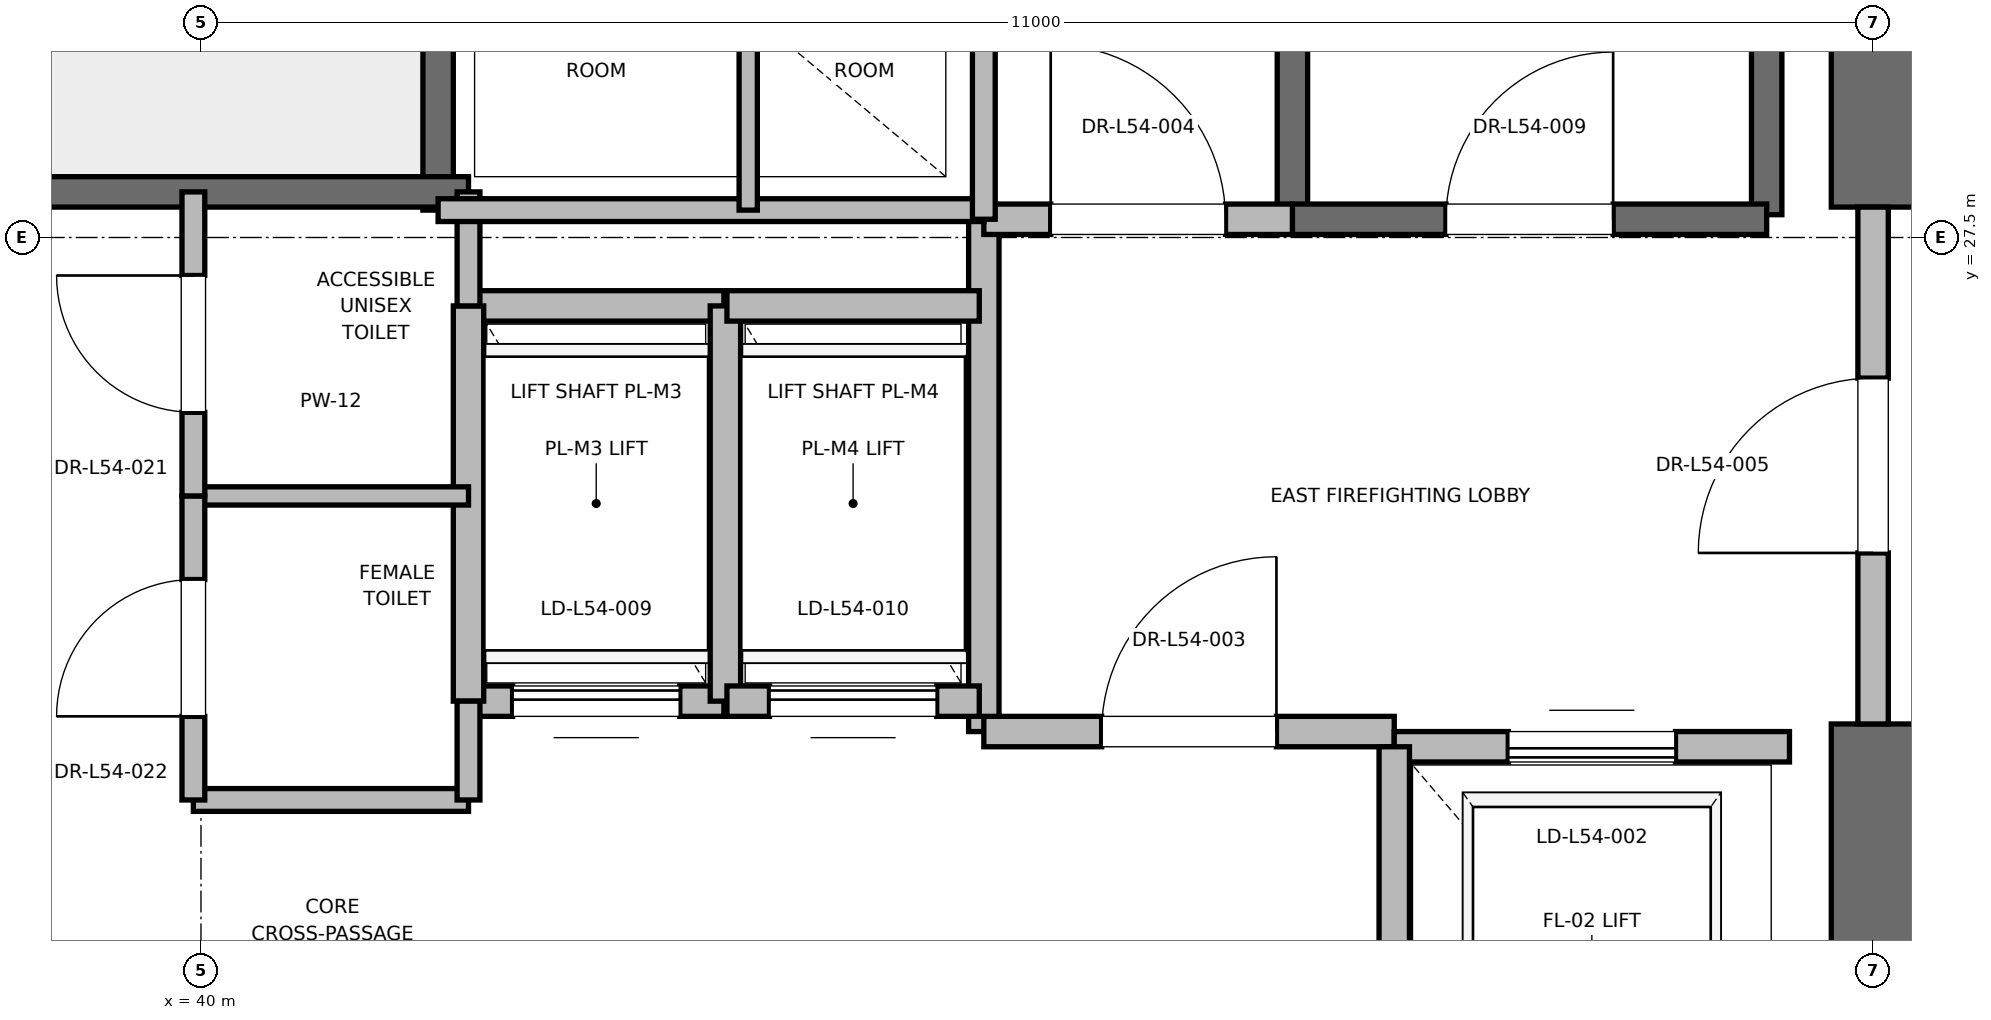
"""IFC4 building model, lengths in metres.
Left out: names, types, materials, properties, quantities, classifications, styles, units other than length and angle.
Written with IfcOpenShell. Run it as: python <this file> out.ifc"""

import sys

from ifc_helpers import new_model, si_unit, direction, frame, frame_2d, origin, place, context, subcontext, project, spatial, rectangle, extrude, element, fill, save


model = new_model("IFC4")
c1 = context("Model", 3, precision=1e-05, world=origin(), true_north=direction((0.0, 1.0)))
c2 = subcontext(c1, "Body", "Model", "MODEL_VIEW")
j1 = project(units=[si_unit("LENGTHUNIT", "METRE"), si_unit("PLANEANGLEUNIT", "RADIAN")], contexts=[c1])
p1 = place(None, origin())
s1 = spatial("IfcSite", under=j1, at=p1, CompositionType="ELEMENT")
p2 = place(p1, origin())
s2 = spatial("IfcBuilding", under=s1, at=p2, CompositionType="ELEMENT")
p3 = place(p2, frame((0.0, 0.0, 233.2)))
s3 = spatial("IfcBuildingStorey", under=s2, at=p3, CompositionType="ELEMENT", Elevation=233.2)
p4 = place(p3, frame((51.0, 18.5, 0.0), z_axis=(0.0, 0.0, 1.0), x_axis=(0.0, 1.0, 0.0)))
e1 = element("IfcWall", 1, at=p4, inside=s3, PredefinedType="SHEAR", context=c2, shape_type="SweptSolid", body=[
    extrude(rectangle(XDim=5.8, YDim=0.55, at=frame_2d((2.9, 0.0))), origin(), (0.0, 0.0, 1.0), 4.7),
])
p5 = place(p3, frame((51.0, 27.7, 0.0), z_axis=(0.0, 0.0, 1.0), x_axis=(0.0, 1.0, 0.0)))
e2 = element("IfcWall", 2, at=p5, inside=s3, PredefinedType="SHEAR", context=c2, shape_type="SweptSolid", body=[
    extrude(rectangle(XDim=8.8, YDim=0.55, at=frame_2d((4.4, 0.0))), origin(), (0.0, 0.0, 1.0), 4.7),
])
p6 = place(p3, frame((50.3, 27.65, 0.0), z_axis=(0.0, 0.0, 1.0), x_axis=(0.0, 1.0, 0.0)))
e3 = element("IfcWall", 3, at=p6, inside=s3, PredefinedType="SOLIDWALL", context=c2, shape_type="SweptSolid", body=[
    extrude(rectangle(XDim=8.15, YDim=0.2, at=frame_2d((4.075, 0.0))), origin(), (0.0, 0.0, 1.0), 4.7),
])
p7 = place(p3, frame((47.18, 27.62, 0.0), z_axis=(0.0, 0.0, 1.0), x_axis=(0.0, 1.0, 0.0)))
e4 = element("IfcWall", 4, at=p7, inside=s3, PredefinedType="SOLIDWALL", context=c2, shape_type="SweptSolid", body=[
    extrude(rectangle(XDim=8.18, YDim=0.2, at=frame_2d((4.09, 0.0))), origin(), (0.0, 0.0, 1.0), 4.7),
])
p8 = place(p3, frame((47.18, 27.62, 0.0), z_axis=(0.0, 0.0, 1.0), x_axis=(1.0, 0.0, 0.0)))
e5 = element("IfcWall", 5, at=p8, inside=s3, PredefinedType="SOLIDWALL", context=c2, shape_type="SweptSolid", body=[
    extrude(rectangle(XDim=3.12, YDim=0.2, at=frame_2d((1.56, 0.0))), origin(), (0.0, 0.0, 1.0), 4.7),
])
p9 = place(p8, frame((1.01, 0.0, 0.0)))
e6 = element("IfcOpeningElement", 6, at=p9, cuts=e5, PredefinedType="OPENING", context=c2, shape_type="SweptSolid", body=[
    extrude(rectangle(XDim=1.1, YDim=2.15, at=frame_2d((0.55, 1.075))), frame((0.0, 0.1, 0.0), z_axis=(0.0, -1.0, 0.0), x_axis=(1.0, 0.0, 0.0)), (0.0, 0.0, 1.0), 0.2),
])
p10 = place(p3, frame((41.56, 27.68, 0.0), z_axis=(0.0, 0.0, 1.0), x_axis=(0.0, 1.0, 0.0)))
e7 = element("IfcWall", 7, at=p10, inside=s3, PredefinedType="SOLIDWALL", context=c2, shape_type="SweptSolid", body=[
    extrude(rectangle(XDim=8.57, YDim=0.2, at=frame_2d((4.285, 0.0))), origin(), (0.0, 0.0, 1.0), 4.7),
])
p11 = place(p3, frame((38.44, 27.8, 0.0), z_axis=(0.0, 0.0, 1.0), x_axis=(1.0, 0.0, 0.0)))
e8 = element("IfcWall", 8, at=p11, inside=s3, PredefinedType="SOLIDWALL", context=c2, shape_type="SweptSolid", body=[
    extrude(rectangle(XDim=3.32, YDim=0.2, at=frame_2d((1.66, 0.0))), origin(), (0.0, 0.0, 1.0), 4.7),
])
p12 = place(p3, frame((45.15, 24.25, 0.0), z_axis=(0.0, 0.0, 1.0), x_axis=(0.0, 1.0, 0.0)))
e9 = element("IfcWall", 9, at=p12, inside=s3, PredefinedType="PARTITIONING", context=c2, shape_type="SweptSolid", body=[
    extrude(rectangle(XDim=3.37, YDim=0.2, at=frame_2d((1.685, 0.0))), origin(), (0.0, 0.0, 1.0), 4.7),
])
p13 = place(p3, frame((45.15, 24.25, 0.0), z_axis=(0.0, 0.0, 1.0), x_axis=(1.0, 0.0, 0.0)))
e10 = element("IfcWall", 10, at=p13, inside=s3, PredefinedType="PARTITIONING", context=c2, shape_type="SweptSolid", body=[
    extrude(rectangle(XDim=2.7, YDim=0.2, at=frame_2d((1.35, 0.0))), origin(), (0.0, 0.0, 1.0), 4.7),
])
p14 = place(p13, frame((0.775, 0.0, 0.0)))
e11 = element("IfcOpeningElement", 11, at=p14, cuts=e10, PredefinedType="OPENING", context=c2, shape_type="SweptSolid", body=[
    extrude(rectangle(XDim=1.15, YDim=2.2, at=frame_2d((0.575, 1.1))), frame((0.0, 0.1, 0.0), z_axis=(0.0, -1.0, 0.0), x_axis=(1.0, 0.0, 0.0)), (0.0, 0.0, 1.0), 0.2),
])
p15 = place(p3, frame((45.15, 27.62, 0.0), z_axis=(0.0, 0.0, 1.0), x_axis=(1.0, 0.0, 0.0)))
e12 = element("IfcWall", 12, at=p15, inside=s3, PredefinedType="PARTITIONING", context=c2, shape_type="SweptSolid", body=[
    extrude(rectangle(XDim=2.03, YDim=0.2, at=frame_2d((1.015, 0.0))), origin(), (0.0, 0.0, 1.0), 4.7),
])
p16 = place(p15, frame((0.44, 0.0, 0.0)))
e13 = element("IfcOpeningElement", 13, at=p16, cuts=e12, PredefinedType="OPENING", context=c2, shape_type="SweptSolid", body=[
    extrude(rectangle(XDim=1.15, YDim=2.2, at=frame_2d((0.575, 1.1))), frame((0.0, 0.1, 0.0), z_axis=(0.0, -1.0, 0.0), x_axis=(1.0, 0.0, 0.0)), (0.0, 0.0, 1.0), 0.2),
])
p17 = place(p3, frame((51.0, 24.3, 0.0), z_axis=(0.0, 0.0, 1.0), x_axis=(0.0, 1.0, 0.0)))
e14 = element("IfcWall", 14, at=p17, inside=s3, PredefinedType="PARTITIONING", context=c2, shape_type="SweptSolid", body=[
    extrude(rectangle(XDim=3.4, YDim=0.2, at=frame_2d((1.7, 0.0))), origin(), (0.0, 0.0, 1.0), 3.68),
])
p18 = place(p17, frame((1.125, 0.0, 0.0)))
e15 = element("IfcOpeningElement", 15, at=p18, cuts=e14, PredefinedType="OPENING", context=c2, shape_type="SweptSolid", body=[
    extrude(rectangle(XDim=1.15, YDim=2.2, at=frame_2d((0.575, 1.1))), frame((0.0, 0.1, 0.0), z_axis=(0.0, -1.0, 0.0), x_axis=(1.0, 0.0, 0.0)), (0.0, 0.0, 1.0), 0.2),
])
p19 = place(p3, frame((50.45, 24.15, 0.0), z_axis=(0.0, 0.0, 1.0), x_axis=(-1.0, 0.0, 0.0)))
e16 = element("IfcWall", 16, at=p19, inside=s3, PredefinedType="SOLIDWALL", context=c2, shape_type="SweptSolid", body=[
    extrude(rectangle(XDim=2.6, YDim=0.2, at=frame_2d((1.3, 0.0))), origin(), (0.0, 0.0, 1.0), 3.68),
])
p20 = place(p19, frame((0.75, 0.0, 0.0)))
e17 = element("IfcOpeningElement", 17, at=p20, cuts=e16, PredefinedType="OPENING", context=c2, shape_type="SweptSolid", body=[
    extrude(rectangle(XDim=1.1, YDim=2.2, at=frame_2d((0.55, 1.1))), frame((0.0, 0.1, 0.0), z_axis=(0.0, -1.0, 0.0), x_axis=(1.0, 0.0, 0.0)), (0.0, 0.0, 1.0), 0.2),
])
p21 = place(p3, frame((47.85, 24.15, 0.0), z_axis=(0.0, 0.0, 1.0), x_axis=(0.0, -1.0, 0.0)))
e18 = element("IfcWall", 18, at=p21, inside=s3, PredefinedType="SOLIDWALL", context=c2, shape_type="SweptSolid", body=[
    extrude(rectangle(XDim=3.0, YDim=0.2, at=frame_2d((1.5, 0.0))), origin(), (0.0, 0.0, 1.0), 4.7),
])
p22 = place(p3, frame((41.76, 24.45, 0.0), z_axis=(0.0, 0.0, 1.0), x_axis=(1.0, 0.0, 0.0)))
e19 = element("IfcWall", 19, at=p22, inside=s3, PredefinedType="SOLIDWALL", context=c2, shape_type="SweptSolid", body=[
    extrude(rectangle(XDim=1.68, YDim=0.2, at=frame_2d((0.84, 0.0))), origin(), (0.0, 0.0, 1.0), 4.7),
])
p23 = place(p22, frame((0.29, 0.0, 0.0)))
e20 = element("IfcOpeningElement", 20, at=p23, cuts=e19, PredefinedType="OPENING", context=c2, shape_type="SweptSolid", body=[
    extrude(rectangle(XDim=1.1, YDim=2.2, at=frame_2d((0.55, 1.1))), frame((0.0, 0.1, 0.0), z_axis=(0.0, -1.0, 0.0), x_axis=(1.0, 0.0, 0.0)), (0.0, 0.0, 1.0), 0.2),
])
p24 = place(p3, frame((43.44, 27.05, 0.0), z_axis=(0.0, 0.0, 1.0), x_axis=(-1.0, 0.0, 0.0)))
e21 = element("IfcWall", 21, at=p24, inside=s3, PredefinedType="SOLIDWALL", context=c2, shape_type="SweptSolid", body=[
    extrude(rectangle(XDim=1.68, YDim=0.2, at=frame_2d((0.84, 0.0))), origin(), (0.0, 0.0, 1.0), 4.7),
])
for number, where, z_axis, x_axis in (
    (22, (41.76, 27.05, 0.0), (0.0, 0.0, 1.0), (0.0, -1.0, 0.0)),
    (23, (43.45, 24.45, 0.0), (0.0, 0.0, 1.0), (0.0, 1.0, 0.0)),
):
    element("IfcWall", number, at=place(p3, frame(where, z_axis=z_axis, x_axis=x_axis)), inside=s3, PredefinedType="SOLIDWALL", context=c2, shape_type="SweptSolid", body=[
        extrude(rectangle(XDim=2.6, YDim=0.2, at=frame_2d((1.3, 0.0))), origin(), (0.0, 0.0, 1.0), 4.7),
    ])
p25 = place(p3, frame((43.46, 24.45, 0.0), z_axis=(0.0, 0.0, 1.0), x_axis=(1.0, 0.0, 0.0)))
e24 = element("IfcWall", 24, at=p25, inside=s3, PredefinedType="SOLIDWALL", context=c2, shape_type="SweptSolid", body=[
    extrude(rectangle(XDim=1.66, YDim=0.2, at=frame_2d((0.83, 0.0))), origin(), (0.0, 0.0, 1.0), 4.7),
])
p26 = place(p25, frame((0.28, 0.0, 0.0)))
e25 = element("IfcOpeningElement", 25, at=p26, cuts=e24, PredefinedType="OPENING", context=c2, shape_type="SweptSolid", body=[
    extrude(rectangle(XDim=1.1, YDim=2.2, at=frame_2d((0.55, 1.1))), frame((0.0, 0.1, 0.0), z_axis=(0.0, -1.0, 0.0), x_axis=(1.0, 0.0, 0.0)), (0.0, 0.0, 1.0), 0.2),
])
p27 = place(p3, frame((45.12, 27.05, 0.0), z_axis=(0.0, 0.0, 1.0), x_axis=(-1.0, 0.0, 0.0)))
e26 = element("IfcWall", 26, at=p27, inside=s3, PredefinedType="SOLIDWALL", context=c2, shape_type="SweptSolid", body=[
    extrude(rectangle(XDim=1.66, YDim=0.2, at=frame_2d((0.83, 0.0))), origin(), (0.0, 0.0, 1.0), 4.7),
])
p28 = place(p3, frame((39.95, 23.8, 0.0), z_axis=(0.0, 0.0, 1.0), x_axis=(1.0, 0.0, 0.0)))
e27 = element("IfcWall", 27, at=p28, inside=s3, PredefinedType="PARTITIONING", context=c2, shape_type="SweptSolid", body=[
    extrude(rectangle(XDim=1.81, YDim=0.15, at=frame_2d((0.905, 0.0))), origin(), (0.0, 0.0, 1.0), 2.85),
])
p29 = place(p3, frame((39.95, 25.8, 0.0), z_axis=(0.0, 0.0, 1.0), x_axis=(1.0, 0.0, 0.0)))
e28 = element("IfcWall", 28, at=p29, inside=s3, PredefinedType="PARTITIONING", context=c2, shape_type="SweptSolid", body=[
    extrude(rectangle(XDim=1.81, YDim=0.12, at=frame_2d((0.905, 0.0))), origin(), (0.0, 0.0, 1.0), 2.85),
])
p30 = place(p3, frame((41.76, 23.8, 0.0), z_axis=(0.0, 0.0, 1.0), x_axis=(0.0, 1.0, 0.0)))
e29 = element("IfcWall", 29, at=p30, inside=s3, PredefinedType="PARTITIONING", context=c2, shape_type="SweptSolid", body=[
    extrude(rectangle(XDim=0.65, YDim=0.15, at=frame_2d((0.325, 0.0))), origin(), (0.0, 0.0, 1.0), 2.85),
])
p31 = place(p3, frame((41.76, 27.05, 0.0), z_axis=(0.0, 0.0, 1.0), x_axis=(0.0, 1.0, 0.0)))
e30 = element("IfcWall", 30, at=p31, inside=s3, PredefinedType="PARTITIONING", context=c2, shape_type="SweptSolid", body=[
    extrude(rectangle(XDim=0.75, YDim=0.15, at=frame_2d((0.375, 0.0))), origin(), (0.0, 0.0, 1.0), 2.85),
])
p32 = place(p3, frame((39.95, 23.8, 0.0), z_axis=(0.0, 0.0, 1.0), x_axis=(0.0, 1.0, 0.0)))
e31 = element("IfcWall", 31, at=p32, inside=s3, PredefinedType="PARTITIONING", context=c2, shape_type="SweptSolid", body=[
    extrude(rectangle(XDim=2.0, YDim=0.15, at=frame_2d((1.0, 0.0))), origin(), (0.0, 0.0, 1.0), 2.85),
])
p33 = place(p32, frame((0.55, 0.0, 0.0)))
e32 = element("IfcOpeningElement", 32, at=p33, cuts=e31, PredefinedType="OPENING", context=c2, shape_type="SweptSolid", body=[
    extrude(rectangle(XDim=0.9, YDim=2.1, at=frame_2d((0.45, 1.05))), frame((0.0, 0.075, 0.0), z_axis=(0.0, -1.0, 0.0), x_axis=(1.0, 0.0, 0.0)), (0.0, 0.0, 1.0), 0.15),
])
p34 = place(p3, frame((39.95, 25.8, 0.0), z_axis=(0.0, 0.0, 1.0), x_axis=(0.0, 1.0, 0.0)))
e33 = element("IfcWall", 33, at=p34, inside=s3, PredefinedType="PARTITIONING", context=c2, shape_type="SweptSolid", body=[
    extrude(rectangle(XDim=2.0, YDim=0.15, at=frame_2d((1.0, 0.0))), origin(), (0.0, 0.0, 1.0), 2.85),
])
p35 = place(p34, frame((0.55, 0.0, 0.0)))
e34 = element("IfcOpeningElement", 34, at=p35, cuts=e33, PredefinedType="OPENING", context=c2, shape_type="SweptSolid", body=[
    extrude(rectangle(XDim=0.9, YDim=2.1, at=frame_2d((0.45, 1.05))), frame((0.0, 0.075, 0.0), z_axis=(0.0, -1.0, 0.0), x_axis=(1.0, 0.0, 0.0)), (0.0, 0.0, 1.0), 0.15),
])
p36 = place(p3, frame((41.56, 27.68, 0.0), z_axis=(0.0, 0.0, 1.0), x_axis=(1.0, 0.0, 0.0)))
e35 = element("IfcWall", 35, at=p36, inside=s3, PredefinedType="PARTITIONING", context=c2, shape_type="SweptSolid", body=[
    extrude(rectangle(XDim=3.59, YDim=0.15, at=frame_2d((1.795, 0.0))), origin(), (0.0, 0.0, 1.0), 2.85),
])
p37 = place(p3, frame((45.15, 27.62, 0.0), z_axis=(0.0, 0.0, 1.0), x_axis=(0.0, 1.0, 0.0)))
e36 = element("IfcWall", 36, at=p37, inside=s3, PredefinedType="PARTITIONING", context=c2, shape_type="SweptSolid", body=[
    extrude(rectangle(XDim=3.1, YDim=0.15, at=frame_2d((1.55, 0.0))), origin(), (0.0, 0.0, 1.0), 2.85),
])
p38 = place(p3, frame((43.6, 27.68, 0.0), z_axis=(0.0, 0.0, 1.0), x_axis=(0.0, 1.0, 0.0)))
e37 = element("IfcWall", 37, at=p38, inside=s3, PredefinedType="PARTITIONING", context=c2, shape_type="SweptSolid", body=[
    extrude(rectangle(XDim=3.04, YDim=0.12, at=frame_2d((1.52, 0.0))), origin(), (0.0, 0.0, 1.0), 2.85),
])
p39 = place(p9, origin())
e38 = element("IfcDoor", 38, at=p39, inside=s3, OperationType="SINGLE_SWING_RIGHT", PredefinedType="DOOR", context=c2, shape_type="SweptSolid", body=[
    extrude(rectangle(XDim=1.1, YDim=2.15, at=frame_2d((0.55, 1.075))), frame((0.0, 0.025, 0.0), z_axis=(0.0, -1.0, 0.0), x_axis=(1.0, 0.0, 0.0)), (0.0, 0.0, 1.0), 0.05),
])
fill(e6, e38)
p40 = place(p14, origin())
e39 = element("IfcDoor", 39, at=p40, inside=s3, OperationType="SINGLE_SWING_RIGHT", PredefinedType="DOOR", context=c2, shape_type="SweptSolid", body=[
    extrude(rectangle(XDim=1.15, YDim=2.2, at=frame_2d((0.575, 1.1))), frame((0.0, 0.025, 0.0), z_axis=(0.0, -1.0, 0.0), x_axis=(1.0, 0.0, 0.0)), (0.0, 0.0, 1.0), 0.05),
])
fill(e11, e39)
p41 = place(p16, origin())
e40 = element("IfcDoor", 40, at=p41, inside=s3, OperationType="SINGLE_SWING_LEFT", PredefinedType="DOOR", context=c2, shape_type="SweptSolid", body=[
    extrude(rectangle(XDim=1.15, YDim=2.2, at=frame_2d((0.575, 1.1))), frame((0.0, 0.025, 0.0), z_axis=(0.0, -1.0, 0.0), x_axis=(1.0, 0.0, 0.0)), (0.0, 0.0, 1.0), 0.05),
])
fill(e13, e40)
p42 = place(p18, origin())
e41 = element("IfcDoor", 41, at=p42, inside=s3, OperationType="SINGLE_SWING_LEFT", PredefinedType="DOOR", context=c2, shape_type="SweptSolid", body=[
    extrude(rectangle(XDim=1.15, YDim=2.2, at=frame_2d((0.575, 1.1))), frame((0.0, 0.025, 0.0), z_axis=(0.0, -1.0, 0.0), x_axis=(1.0, 0.0, 0.0)), (0.0, 0.0, 1.0), 0.05),
])
fill(e15, e41)
p43 = place(p20, origin())
e42 = element("IfcDoor", 42, at=p43, inside=s3, OperationType="SLIDING_TO_RIGHT", PredefinedType="DOOR", context=c2, shape_type="SweptSolid", body=[
    extrude(rectangle(XDim=1.1, YDim=2.2, at=frame_2d((0.55, 1.1))), frame((0.0, 0.025, 0.0), z_axis=(0.0, -1.0, 0.0), x_axis=(1.0, 0.0, 0.0)), (0.0, 0.0, 1.0), 0.05),
])
fill(e17, e42)
p44 = place(p23, origin())
e43 = element("IfcDoor", 43, at=p44, inside=s3, OperationType="SLIDING_TO_RIGHT", PredefinedType="DOOR", context=c2, shape_type="SweptSolid", body=[
    extrude(rectangle(XDim=1.1, YDim=2.2, at=frame_2d((0.55, 1.1))), frame((0.0, 0.025, 0.0), z_axis=(0.0, -1.0, 0.0), x_axis=(1.0, 0.0, 0.0)), (0.0, 0.0, 1.0), 0.05),
])
fill(e20, e43)
p45 = place(p26, origin())
e44 = element("IfcDoor", 44, at=p45, inside=s3, OperationType="SLIDING_TO_RIGHT", PredefinedType="DOOR", context=c2, shape_type="SweptSolid", body=[
    extrude(rectangle(XDim=1.1, YDim=2.2, at=frame_2d((0.55, 1.1))), frame((0.0, 0.025, 0.0), z_axis=(0.0, -1.0, 0.0), x_axis=(1.0, 0.0, 0.0)), (0.0, 0.0, 1.0), 0.05),
])
fill(e25, e44)
p46 = place(p33, origin())
e45 = element("IfcDoor", 45, at=p46, inside=s3, OperationType="SINGLE_SWING_LEFT", PredefinedType="DOOR", context=c2, shape_type="SweptSolid", body=[
    extrude(rectangle(XDim=0.9, YDim=2.1, at=frame_2d((0.45, 1.05))), frame((0.0, 0.025, 0.0), z_axis=(0.0, -1.0, 0.0), x_axis=(1.0, 0.0, 0.0)), (0.0, 0.0, 1.0), 0.05),
])
fill(e32, e45)
p47 = place(p35, origin())
e46 = element("IfcDoor", 46, at=p47, inside=s3, OperationType="SINGLE_SWING_RIGHT", PredefinedType="DOOR", context=c2, shape_type="SweptSolid", body=[
    extrude(rectangle(XDim=0.9, YDim=2.1, at=frame_2d((0.45, 1.05))), frame((0.0, 0.025, 0.0), z_axis=(0.0, -1.0, 0.0), x_axis=(1.0, 0.0, 0.0)), (0.0, 0.0, 1.0), 0.05),
])
fill(e34, e46)
save(model, sys.argv[1])
